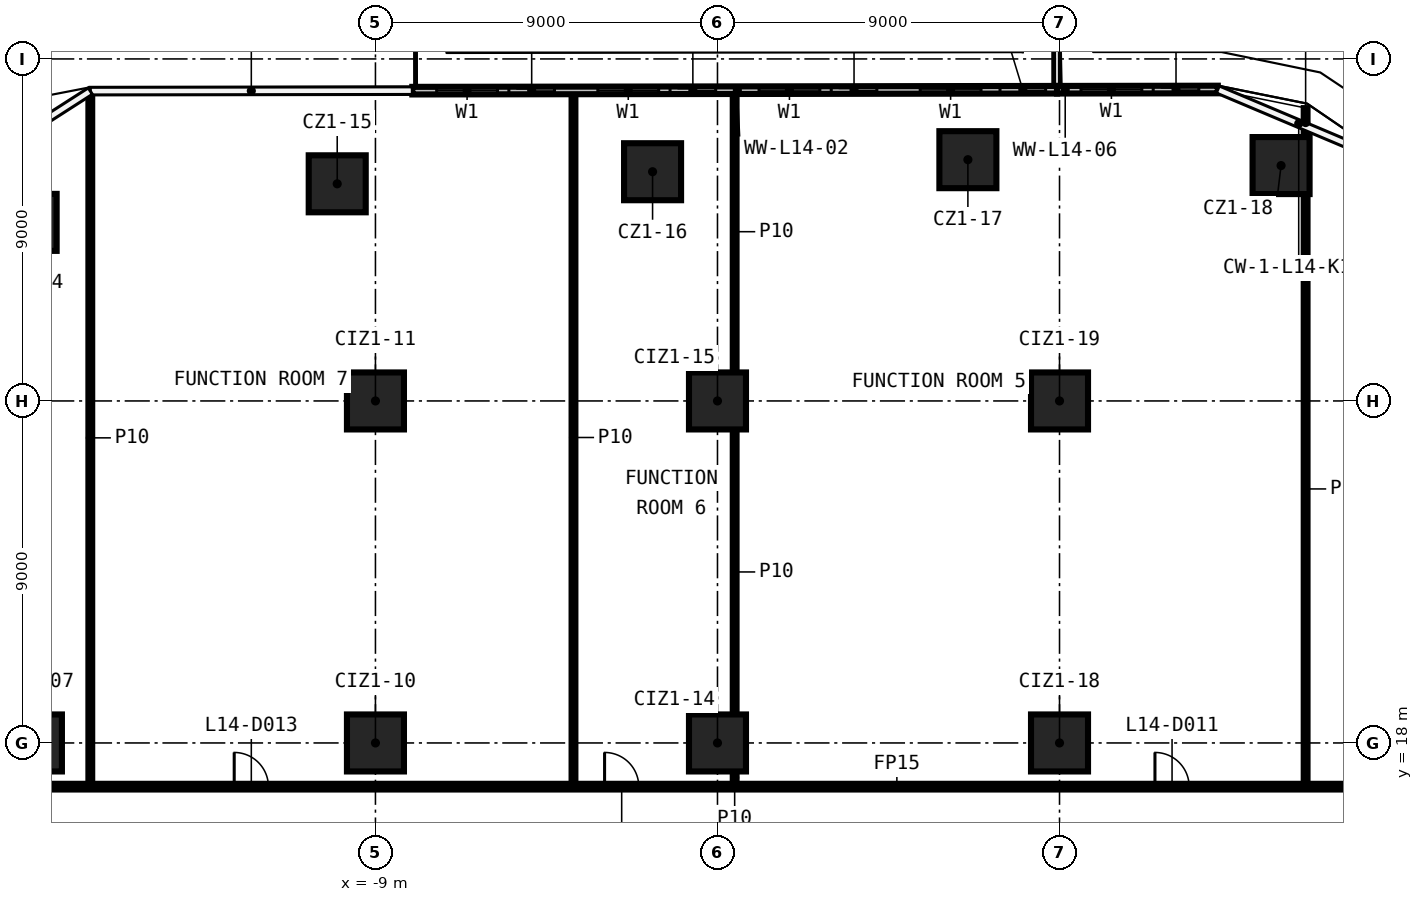
"""IFC4 building model, lengths in metres.
Left out: names, types, materials, properties, quantities, classifications, styles, units other than length and angle.
Written with IfcOpenShell. Run it as: python <this file> out.ifc"""

import sys

from ifc_helpers import new_model, si_unit, direction, frame, frame_2d, origin, origin_2d, place, context, subcontext, project, spatial, rectangle, extrude, element, fill, save


model = new_model("IFC4")
c1 = context("Model", 3, precision=1e-05, world=origin(), true_north=direction((0.0, 1.0)))
c2 = subcontext(c1, "Body", "Model", "MODEL_VIEW")
j1 = project(units=[si_unit("LENGTHUNIT", "METRE"), si_unit("PLANEANGLEUNIT", "RADIAN")], contexts=[c1])
p1 = place(None, origin())
s1 = spatial("IfcSite", under=j1, at=p1, CompositionType="ELEMENT")
p2 = place(p1, origin())
s2 = spatial("IfcBuilding", under=s1, at=p2, CompositionType="ELEMENT")
p3 = place(p2, frame((0.0, 0.0, 73.6)))
s3 = spatial("IfcBuildingStorey", under=s2, at=p3, CompositionType="ELEMENT", Elevation=73.6)
for number, where, z_axis, x_axis in (
    (1, (-18.139, 31.699, 0.0), (0.0, 0.0, 1.0), (1.0, 0.0, 0.0)),
    (2, (-10.006, 32.714, 0.0), (0.0, 0.0, 1.0), (1.0, 0.0, 0.0)),
    (3, (-1.708, 33.032, 0.0), (0.0, 0.0, 1.0), (1.0, 0.0, 0.0)),
    (4, (6.589, 33.349, 0.0), (0.0, 0.0, 1.0), (1.0, 0.0, 0.0)),
    (5, (14.83, 33.194, 0.0), (0.0, 0.0, 1.0), (1.0, 0.0, 0.0)),
    (6, (-18.0, 18.0, 0.0), (0.0, 0.0, 1.0), (1.0, 0.0, 0.0)),
    (7, (-9.0, 18.0, 0.0), (0.0, 0.0, 1.0), (1.0, 0.0, 0.0)),
    (8, (-9.0, 27.0, 0.0), (0.0, 0.0, 1.0), (1.0, 0.0, 0.0)),
    (9, (0.0, 18.0, 0.0), (0.0, 0.0, 1.0), (1.0, 0.0, 0.0)),
    (10, (0.0, 27.0, 0.0), (0.0, 0.0, 1.0), (1.0, 0.0, 0.0)),
    (11, (9.0, 18.0, 0.0), (0.0, 0.0, 1.0), (1.0, 0.0, 0.0)),
    (12, (9.0, 27.0, 0.0), (0.0, 0.0, 1.0), (1.0, 0.0, 0.0)),
):
    element("IfcColumn", number, at=place(p3, frame(where, z_axis=z_axis, x_axis=x_axis)), inside=s3, PredefinedType="COLUMN", context=c2, shape_type="SweptSolid", body=[
        extrude(rectangle(XDim=1.5, YDim=1.5, at=origin_2d()), origin(), (0.0, 0.0, 1.0), 3.3),
    ])
p4 = place(p3, frame((-19.925, 16.85, 0.0), z_axis=(0.0, 0.0, 1.0), x_axis=(1.0, 0.0, 0.0)))
e13 = element("IfcWall", 13, at=p4, inside=s3, PredefinedType="PARTITIONING", context=c2, shape_type="SweptSolid", body=[
    extrude(rectangle(XDim=39.85, YDim=0.15, at=frame_2d((19.925, 0.0))), origin(), (0.0, 0.0, 1.0), 3.3),
])
p5 = place(p4, frame((31.436, 0.0, 0.0)))
e14 = element("IfcOpeningElement", 14, at=p5, cuts=e13, PredefinedType="OPENING", context=c2, shape_type="SweptSolid", body=[
    extrude(rectangle(XDim=0.9, YDim=2.1, at=frame_2d((0.45, 1.05))), frame((0.0, 0.085, 0.0), z_axis=(0.0, -1.0, 0.0), x_axis=(1.0, 0.0, 0.0)), (0.0, 0.0, 1.0), 0.17),
])
p6 = place(p4, frame((16.954, 0.0, 0.0)))
e15 = element("IfcOpeningElement", 15, at=p6, cuts=e13, PredefinedType="OPENING", context=c2, shape_type="SweptSolid", body=[
    extrude(rectangle(XDim=0.9, YDim=2.1, at=frame_2d((0.45, 1.05))), frame((0.0, 0.085, 0.0), z_axis=(0.0, -1.0, 0.0), x_axis=(1.0, 0.0, 0.0)), (0.0, 0.0, 1.0), 0.17),
])
p7 = place(p4, frame((7.208, 0.0, 0.0)))
e16 = element("IfcOpeningElement", 16, at=p7, cuts=e13, PredefinedType="OPENING", context=c2, shape_type="SweptSolid", body=[
    extrude(rectangle(XDim=0.9, YDim=2.1, at=frame_2d((0.45, 1.05))), frame((0.0, 0.085, 0.0), z_axis=(0.0, -1.0, 0.0), x_axis=(1.0, 0.0, 0.0)), (0.0, 0.0, 1.0), 0.17),
])
p8 = place(p3, frame((15.476, 16.925, 0.0), z_axis=(0.0, 0.0, 1.0), x_axis=(0.0, 1.0, 0.0)))
e17 = element("IfcWall", 17, at=p8, inside=s3, PredefinedType="PARTITIONING", context=c2, shape_type="SweptSolid", body=[
    extrude(rectangle(XDim=15.519, YDim=0.1, at=frame_2d((7.76, 0.0))), origin(), (0.0, 0.0, 1.0), 3.3),
])
p9 = place(p3, frame((15.476, 33.944, 0.0), z_axis=(0.0, 0.0, 1.0), x_axis=(0.0, 1.0, 0.0)))
e18 = element("IfcWall", 18, at=p9, inside=s3, PredefinedType="PARTITIONING", context=c2, shape_type="SweptSolid", body=[
    extrude(rectangle(XDim=0.762, YDim=0.1, at=frame_2d((0.381, 0.0))), origin(), (0.0, 0.0, 1.0), 3.3),
])
p10 = place(p3, frame((0.452, 16.925, 0.0), z_axis=(0.0, 0.0, 1.0), x_axis=(0.0, 1.0, 0.0)))
e19 = element("IfcWall", 19, at=p10, inside=s3, PredefinedType="PARTITIONING", context=c2, shape_type="SweptSolid", body=[
    extrude(rectangle(XDim=0.325, YDim=0.1, at=frame_2d((0.163, 0.0))), origin(), (0.0, 0.0, 1.0), 3.3),
])
p11 = place(p3, frame((0.452, 18.75, 0.0), z_axis=(0.0, 0.0, 1.0), x_axis=(0.0, 1.0, 0.0)))
e20 = element("IfcWall", 20, at=p11, inside=s3, PredefinedType="PARTITIONING", context=c2, shape_type="SweptSolid", body=[
    extrude(rectangle(XDim=7.5, YDim=0.1, at=frame_2d((3.75, 0.0))), origin(), (0.0, 0.0, 1.0), 3.3),
])
p12 = place(p3, frame((0.452, 27.75, 0.0), z_axis=(0.0, 0.0, 1.0), x_axis=(0.0, 1.0, 0.0)))
e21 = element("IfcWall", 21, at=p12, inside=s3, PredefinedType="PARTITIONING", context=c2, shape_type="SweptSolid", body=[
    extrude(rectangle(XDim=7.407, YDim=0.1, at=frame_2d((3.704, 0.0))), origin(), (0.0, 0.0, 1.0), 3.3),
])
p13 = place(p3, frame((-3.789, 16.925, 0.0), z_axis=(0.0, 0.0, 1.0), x_axis=(0.0, 1.0, 0.0)))
e22 = element("IfcWall", 22, at=p13, inside=s3, PredefinedType="PARTITIONING", context=c2, shape_type="SweptSolid", body=[
    extrude(rectangle(XDim=18.226, YDim=0.1, at=frame_2d((9.113, 0.0))), origin(), (0.0, 0.0, 1.0), 3.3),
])
p14 = place(p3, frame((-16.503, 16.925, 0.0), z_axis=(0.0, 0.0, 1.0), x_axis=(0.0, 1.0, 0.0)))
e23 = element("IfcWall", 23, at=p14, inside=s3, PredefinedType="PARTITIONING", context=c2, shape_type="SweptSolid", body=[
    extrude(rectangle(XDim=18.208, YDim=0.1, at=frame_2d((9.104, 0.0))), origin(), (0.0, 0.0, 1.0), 3.3),
])
p15 = place(p3, frame((8.934, 35.19, 0.0), z_axis=(0.0, 0.0, 1.0), x_axis=(-0.999998964441, -0.001439137329, 0.0)))
e24 = element("IfcWall", 24, at=p15, inside=s3, PredefinedType="SOLIDWALL", context=c2, shape_type="SweptSolid", body=[
    extrude(rectangle(XDim=16.964, YDim=0.2, at=frame_2d((8.482, 0.0))), origin(), (0.0, 0.0, 1.0), 3.3),
])
p16 = place(p15, frame((2.0, 0.0, 0.6)))
e25 = element("IfcOpeningElement", 25, at=p16, cuts=e24, PredefinedType="OPENING", context=c2, shape_type="SweptSolid", body=[
    extrude(rectangle(XDim=1.6, YDim=2.4, at=frame_2d((0.8, 1.2))), frame((0.0, 0.11, 0.0), z_axis=(0.0, -1.0, 0.0), x_axis=(1.0, 0.0, 0.0)), (0.0, 0.0, 1.0), 0.22),
])
p17 = place(p15, frame((0.3, 0.0, 0.0)))
e26 = element("IfcOpeningElement", 26, at=p17, cuts=e24, PredefinedType="OPENING", context=c2, shape_type="SweptSolid", body=[
    extrude(rectangle(XDim=1.2, YDim=2.4, at=frame_2d((0.6, 1.2))), frame((0.0, 0.11, 0.0), z_axis=(0.0, -1.0, 0.0), x_axis=(1.0, 0.0, 0.0)), (0.0, 0.0, 1.0), 0.22),
])
p18 = place(p15, frame((6.241, 0.0, 0.6)))
e27 = element("IfcOpeningElement", 27, at=p18, cuts=e24, PredefinedType="OPENING", context=c2, shape_type="SweptSolid", body=[
    extrude(rectangle(XDim=1.6, YDim=2.4, at=frame_2d((0.8, 1.2))), frame((0.0, 0.11, 0.0), z_axis=(0.0, -1.0, 0.0), x_axis=(1.0, 0.0, 0.0)), (0.0, 0.0, 1.0), 0.22),
])
p19 = place(p15, frame((4.741, 0.0, 0.0)))
e28 = element("IfcOpeningElement", 28, at=p19, cuts=e24, PredefinedType="OPENING", context=c2, shape_type="SweptSolid", body=[
    extrude(rectangle(XDim=1.2, YDim=2.4, at=frame_2d((0.6, 1.2))), frame((0.0, 0.11, 0.0), z_axis=(0.0, -1.0, 0.0), x_axis=(1.0, 0.0, 0.0)), (0.0, 0.0, 1.0), 0.22),
])
p20 = place(p15, frame((10.482, 0.0, 0.6)))
e29 = element("IfcOpeningElement", 29, at=p20, cuts=e24, PredefinedType="OPENING", context=c2, shape_type="SweptSolid", body=[
    extrude(rectangle(XDim=1.6, YDim=2.4, at=frame_2d((0.8, 1.2))), frame((0.0, 0.11, 0.0), z_axis=(0.0, -1.0, 0.0), x_axis=(1.0, 0.0, 0.0)), (0.0, 0.0, 1.0), 0.22),
])
p21 = place(p15, frame((8.982, 0.0, 0.0)))
e30 = element("IfcOpeningElement", 30, at=p21, cuts=e24, PredefinedType="OPENING", context=c2, shape_type="SweptSolid", body=[
    extrude(rectangle(XDim=1.2, YDim=2.4, at=frame_2d((0.6, 1.2))), frame((0.0, 0.11, 0.0), z_axis=(0.0, -1.0, 0.0), x_axis=(1.0, 0.0, 0.0)), (0.0, 0.0, 1.0), 0.22),
])
p22 = place(p15, frame((14.723, 0.0, 0.6)))
e31 = element("IfcOpeningElement", 31, at=p22, cuts=e24, PredefinedType="OPENING", context=c2, shape_type="SweptSolid", body=[
    extrude(rectangle(XDim=1.6, YDim=2.4, at=frame_2d((0.8, 1.2))), frame((0.0, 0.11, 0.0), z_axis=(0.0, -1.0, 0.0), x_axis=(1.0, 0.0, 0.0)), (0.0, 0.0, 1.0), 0.22),
])
p23 = place(p15, frame((13.223, 0.0, 0.0)))
e32 = element("IfcOpeningElement", 32, at=p23, cuts=e24, PredefinedType="OPENING", context=c2, shape_type="SweptSolid", body=[
    extrude(rectangle(XDim=1.2, YDim=2.4, at=frame_2d((0.6, 1.2))), frame((0.0, 0.11, 0.0), z_axis=(0.0, -1.0, 0.0), x_axis=(1.0, 0.0, 0.0)), (0.0, 0.0, 1.0), 0.22),
])
p24 = place(p3, frame((13.166, 35.196, 0.0), z_axis=(0.0, 0.0, 1.0), x_axis=(-0.999998959596, -0.001442500374, 0.0)))
e33 = element("IfcWall", 33, at=p24, inside=s3, PredefinedType="SOLIDWALL", context=c2, shape_type="SweptSolid", body=[
    extrude(rectangle(XDim=4.231, YDim=0.2, at=frame_2d((2.116, 0.0))), origin(), (0.0, 0.0, 1.0), 3.3),
])
p25 = place(p24, frame((2.0, 0.0, 0.6)))
e34 = element("IfcOpeningElement", 34, at=p25, cuts=e33, PredefinedType="OPENING", context=c2, shape_type="SweptSolid", body=[
    extrude(rectangle(XDim=1.6, YDim=2.4, at=frame_2d((0.8, 1.2))), frame((0.0, 0.11, 0.0), z_axis=(0.0, -1.0, 0.0), x_axis=(1.0, 0.0, 0.0)), (0.0, 0.0, 1.0), 0.22),
])
p26 = place(p24, frame((0.5, 0.0, 0.0)))
e35 = element("IfcOpeningElement", 35, at=p26, cuts=e33, PredefinedType="OPENING", context=c2, shape_type="SweptSolid", body=[
    extrude(rectangle(XDim=1.2, YDim=2.4, at=frame_2d((0.6, 1.2))), frame((0.0, 0.11, 0.0), z_axis=(0.0, -1.0, 0.0), x_axis=(1.0, 0.0, 0.0)), (0.0, 0.0, 1.0), 0.22),
])
p27 = place(p5, origin())
e36 = element("IfcDoor", 36, at=p27, inside=s3, OperationType="SINGLE_SWING_RIGHT", PredefinedType="DOOR", context=c2, shape_type="SweptSolid", body=[
    extrude(rectangle(XDim=0.9, YDim=2.1, at=frame_2d((0.45, 1.05))), frame((0.0, 0.025, 0.0), z_axis=(0.0, -1.0, 0.0), x_axis=(1.0, 0.0, 0.0)), (0.0, 0.0, 1.0), 0.05),
])
fill(e14, e36)
p28 = place(p6, origin())
e37 = element("IfcDoor", 37, at=p28, inside=s3, OperationType="SINGLE_SWING_LEFT", PredefinedType="DOOR", context=c2, shape_type="SweptSolid", body=[
    extrude(rectangle(XDim=0.9, YDim=2.1, at=frame_2d((0.45, 1.05))), frame((0.0, 0.025, 0.0), z_axis=(0.0, -1.0, 0.0), x_axis=(1.0, 0.0, 0.0)), (0.0, 0.0, 1.0), 0.05),
])
fill(e15, e37)
p29 = place(p7, origin())
e38 = element("IfcDoor", 38, at=p29, inside=s3, OperationType="SINGLE_SWING_RIGHT", PredefinedType="DOOR", context=c2, shape_type="SweptSolid", body=[
    extrude(rectangle(XDim=0.9, YDim=2.1, at=frame_2d((0.45, 1.05))), frame((0.0, 0.025, 0.0), z_axis=(0.0, -1.0, 0.0), x_axis=(1.0, 0.0, 0.0)), (0.0, 0.0, 1.0), 0.05),
])
fill(e16, e38)
p30 = place(p16, origin())
e39 = element("IfcWindow", 39, at=p30, inside=s3, PartitioningType="SINGLE_PANEL", PredefinedType="WINDOW", context=c2, shape_type="SweptSolid", body=[
    extrude(rectangle(XDim=1.6, YDim=2.4, at=frame_2d((0.8, 1.2))), frame((0.0, 0.03, 0.0), z_axis=(0.0, -1.0, 0.0), x_axis=(1.0, 0.0, 0.0)), (0.0, 0.0, 1.0), 0.06),
])
fill(e25, e39)
p31 = place(p17, origin())
e40 = element("IfcDoor", 40, at=p31, inside=s3, OperationType="SLIDING_TO_LEFT", PredefinedType="DOOR", context=c2, shape_type="SweptSolid", body=[
    extrude(rectangle(XDim=1.2, YDim=2.4, at=frame_2d((0.6, 1.2))), frame((0.0, 0.025, 0.0), z_axis=(0.0, -1.0, 0.0), x_axis=(1.0, 0.0, 0.0)), (0.0, 0.0, 1.0), 0.05),
])
fill(e26, e40)
p32 = place(p18, origin())
e41 = element("IfcWindow", 41, at=p32, inside=s3, PartitioningType="SINGLE_PANEL", PredefinedType="WINDOW", context=c2, shape_type="SweptSolid", body=[
    extrude(rectangle(XDim=1.6, YDim=2.4, at=frame_2d((0.8, 1.2))), frame((0.0, 0.03, 0.0), z_axis=(0.0, -1.0, 0.0), x_axis=(1.0, 0.0, 0.0)), (0.0, 0.0, 1.0), 0.06),
])
fill(e27, e41)
p33 = place(p19, origin())
e42 = element("IfcDoor", 42, at=p33, inside=s3, OperationType="SLIDING_TO_LEFT", PredefinedType="DOOR", context=c2, shape_type="SweptSolid", body=[
    extrude(rectangle(XDim=1.2, YDim=2.4, at=frame_2d((0.6, 1.2))), frame((0.0, 0.025, 0.0), z_axis=(0.0, -1.0, 0.0), x_axis=(1.0, 0.0, 0.0)), (0.0, 0.0, 1.0), 0.05),
])
fill(e28, e42)
p34 = place(p20, origin())
e43 = element("IfcWindow", 43, at=p34, inside=s3, PartitioningType="SINGLE_PANEL", PredefinedType="WINDOW", context=c2, shape_type="SweptSolid", body=[
    extrude(rectangle(XDim=1.6, YDim=2.4, at=frame_2d((0.8, 1.2))), frame((0.0, 0.03, 0.0), z_axis=(0.0, -1.0, 0.0), x_axis=(1.0, 0.0, 0.0)), (0.0, 0.0, 1.0), 0.06),
])
fill(e29, e43)
p35 = place(p21, origin())
e44 = element("IfcDoor", 44, at=p35, inside=s3, OperationType="SLIDING_TO_LEFT", PredefinedType="DOOR", context=c2, shape_type="SweptSolid", body=[
    extrude(rectangle(XDim=1.2, YDim=2.4, at=frame_2d((0.6, 1.2))), frame((0.0, 0.025, 0.0), z_axis=(0.0, -1.0, 0.0), x_axis=(1.0, 0.0, 0.0)), (0.0, 0.0, 1.0), 0.05),
])
fill(e30, e44)
p36 = place(p22, origin())
e45 = element("IfcWindow", 45, at=p36, inside=s3, PartitioningType="SINGLE_PANEL", PredefinedType="WINDOW", context=c2, shape_type="SweptSolid", body=[
    extrude(rectangle(XDim=1.6, YDim=2.4, at=frame_2d((0.8, 1.2))), frame((0.0, 0.03, 0.0), z_axis=(0.0, -1.0, 0.0), x_axis=(1.0, 0.0, 0.0)), (0.0, 0.0, 1.0), 0.06),
])
fill(e31, e45)
p37 = place(p23, origin())
e46 = element("IfcDoor", 46, at=p37, inside=s3, OperationType="SLIDING_TO_LEFT", PredefinedType="DOOR", context=c2, shape_type="SweptSolid", body=[
    extrude(rectangle(XDim=1.2, YDim=2.4, at=frame_2d((0.6, 1.2))), frame((0.0, 0.025, 0.0), z_axis=(0.0, -1.0, 0.0), x_axis=(1.0, 0.0, 0.0)), (0.0, 0.0, 1.0), 0.05),
])
fill(e32, e46)
p38 = place(p25, origin())
e47 = element("IfcWindow", 47, at=p38, inside=s3, PartitioningType="SINGLE_PANEL", PredefinedType="WINDOW", context=c2, shape_type="SweptSolid", body=[
    extrude(rectangle(XDim=1.6, YDim=2.4, at=frame_2d((0.8, 1.2))), frame((0.0, 0.03, 0.0), z_axis=(0.0, -1.0, 0.0), x_axis=(1.0, 0.0, 0.0)), (0.0, 0.0, 1.0), 0.06),
])
fill(e34, e47)
p39 = place(p26, origin())
e48 = element("IfcDoor", 48, at=p39, inside=s3, OperationType="SLIDING_TO_LEFT", PredefinedType="DOOR", context=c2, shape_type="SweptSolid", body=[
    extrude(rectangle(XDim=1.2, YDim=2.4, at=frame_2d((0.6, 1.2))), frame((0.0, 0.025, 0.0), z_axis=(0.0, -1.0, 0.0), x_axis=(1.0, 0.0, 0.0)), (0.0, 0.0, 1.0), 0.05),
])
fill(e35, e48)
save(model, sys.argv[1])
